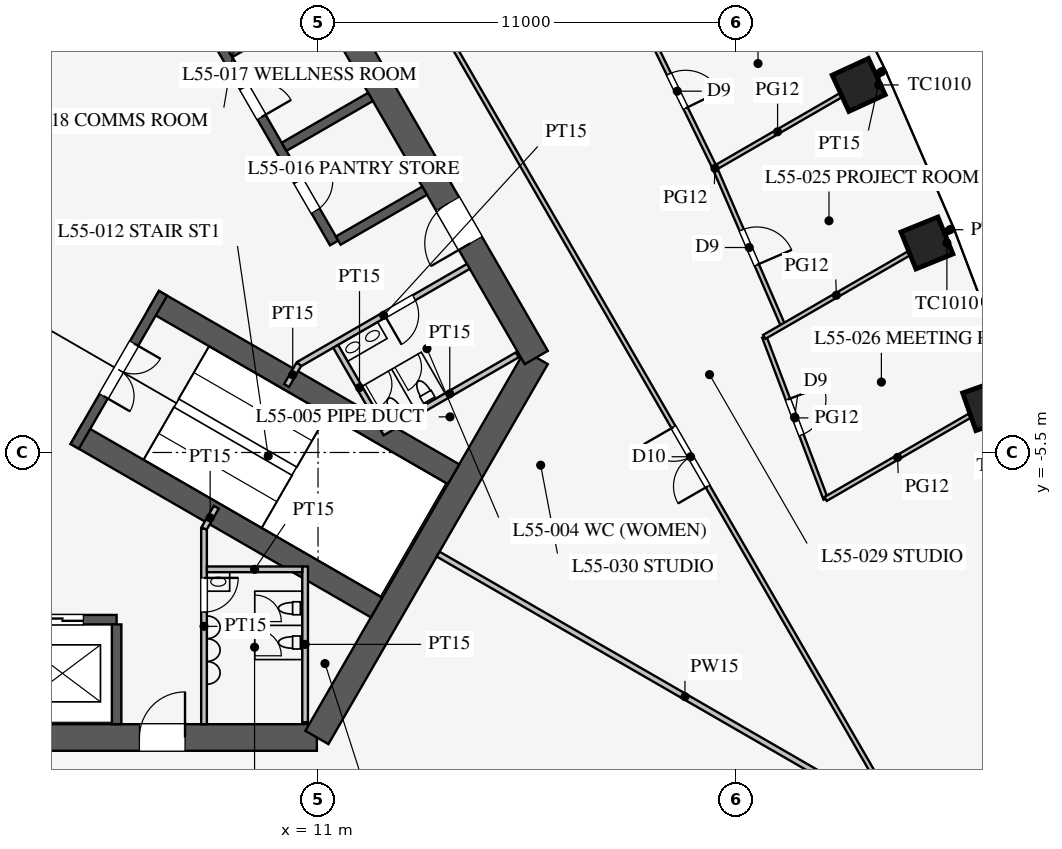
"""IFC4 building model, lengths in metres.
Left out: names, types, materials, properties, quantities, classifications, styles, units other than length and angle.
Written with IfcOpenShell. Run it as: python <this file> out.ifc"""

import sys

from ifc_helpers import new_model, si_unit, direction, frame, frame_2d, origin, origin_2d, place, context, subcontext, project, spatial, rectangle, extrude, element, fill, save


model = new_model("IFC4")
c1 = context("Model", 3, precision=1e-05, world=origin(), true_north=direction((0.0, 1.0)))
c2 = subcontext(c1, "Body", "Model", "MODEL_VIEW")
j1 = project(units=[si_unit("LENGTHUNIT", "METRE"), si_unit("PLANEANGLEUNIT", "RADIAN")], contexts=[c1])
p1 = place(None, origin())
s1 = spatial("IfcSite", under=j1, at=p1, CompositionType="ELEMENT")
p2 = place(p1, origin())
s2 = spatial("IfcBuilding", under=s1, at=p2, CompositionType="ELEMENT")
p3 = place(p2, frame((0.0, 0.0, 240.1)))
s3 = spatial("IfcBuildingStorey", under=s2, at=p3, CompositionType="ELEMENT", Elevation=240.1)
for number, where, z_axis, x_axis in (
    (1, (28.632, -4.254, 0.0), (0.0, 0.0, 1.0), (-0.332, 0.943, 0.0)),
    (2, (27.022, 0.013, 0.0), (0.0, 0.0, 1.0), (-0.376, 0.927, 0.0)),
    (3, (25.227, 4.172, 0.0), (0.0, 0.0, 1.0), (-0.418, 0.908, 0.0)),
):
    element("IfcColumn", number, at=place(p3, frame(where, z_axis=z_axis, x_axis=x_axis)), inside=s3, PredefinedType="COLUMN", context=c2, shape_type="SweptSolid", body=[
        extrude(rectangle(XDim=1.05, YDim=1.05, at=origin_2d()), origin(), (0.0, 0.0, 1.0), 4.2),
    ])
p4 = place(p3, frame((-10.97, -13.0, 0.0), z_axis=(0.0, 0.0, 1.0), x_axis=(1.0, 0.0, 0.0)))
e4 = element("IfcWall", 4, at=p4, inside=s3, PredefinedType="SHEAR", context=c2, shape_type="SweptSolid", body=[
    extrude(rectangle(XDim=21.939, YDim=0.7, at=frame_2d((10.97, 0.0))), origin(), (0.0, 0.0, 1.0), 4.2),
])
p5 = place(p4, frame((17.27, 0.0, 0.0)))
e5 = element("IfcOpeningElement", 5, at=p5, cuts=e4, PredefinedType="OPENING", context=c2, shape_type="SweptSolid", body=[
    extrude(rectangle(XDim=1.2, YDim=2.1, at=frame_2d((0.6, 1.05))), frame((0.0, 0.36, 0.0), z_axis=(0.0, -1.0, 0.0), x_axis=(1.0, 0.0, 0.0)), (0.0, 0.0, 1.0), 0.72),
])
p6 = place(p4, frame((3.47, 0.0, 0.0)))
e6 = element("IfcOpeningElement", 6, at=p6, cuts=e4, PredefinedType="OPENING", context=c2, shape_type="SweptSolid", body=[
    extrude(rectangle(XDim=1.2, YDim=2.1, at=frame_2d((0.6, 1.05))), frame((0.0, 0.36, 0.0), z_axis=(0.0, -1.0, 0.0), x_axis=(1.0, 0.0, 0.0)), (0.0, 0.0, 1.0), 0.72),
])
p7 = place(p3, frame((10.97, -13.0, 0.0), z_axis=(0.0, 0.0, 1.0), x_axis=(0.499995765644, 0.866027848477, 0.0)))
e7 = element("IfcWall", 7, at=p7, inside=s3, PredefinedType="SHEAR", context=c2, shape_type="SweptSolid", body=[
    extrude(rectangle(XDim=11.547, YDim=0.7, at=frame_2d((5.773, 0.0))), origin(), (0.0, 0.0, 1.0), 4.2),
])
p8 = place(p3, frame((16.743, -3.0, 0.0), z_axis=(0.0, 0.0, 1.0), x_axis=(-0.500002442456, 0.866023993627, 0.0)))
e8 = element("IfcWall", 8, at=p8, inside=s3, PredefinedType="SHEAR", context=c2, shape_type="SweptSolid", body=[
    extrude(rectangle(XDim=21.939, YDim=0.7, at=frame_2d((10.97, 0.0))), origin(), (0.0, 0.0, 1.0), 4.2),
])
p9 = place(p8, frame((17.27, 0.0, 0.0)))
e9 = element("IfcOpeningElement", 9, at=p9, cuts=e8, PredefinedType="OPENING", context=c2, shape_type="SweptSolid", body=[
    extrude(rectangle(XDim=1.2, YDim=2.1, at=frame_2d((0.6, 1.05))), frame((0.0, 0.36, 0.0), z_axis=(0.0, -1.0, 0.0), x_axis=(1.0, 0.0, 0.0)), (0.0, 0.0, 1.0), 0.72),
])
p10 = place(p8, frame((3.47, 0.0, 0.0)))
e10 = element("IfcOpeningElement", 10, at=p10, cuts=e8, PredefinedType="OPENING", context=c2, shape_type="SweptSolid", body=[
    extrude(rectangle(XDim=1.2, YDim=2.1, at=frame_2d((0.6, 1.05))), frame((0.0, 0.36, 0.0), z_axis=(0.0, -1.0, 0.0), x_axis=(1.0, 0.0, 0.0)), (0.0, 0.0, 1.0), 0.72),
])
p11 = place(p3, frame((-5.7, -9.9, 0.0), z_axis=(0.0, 0.0, 1.0), x_axis=(1.0, 0.0, 0.0)))
e11 = element("IfcWall", 11, at=p11, inside=s3, PredefinedType="SHEAR", context=c2, shape_type="SweptSolid", body=[
    extrude(rectangle(XDim=11.4, YDim=0.25, at=frame_2d((5.7, 0.0))), origin(), (0.0, 0.0, 1.0), 4.2),
])
p12 = place(p11, frame((0.875, 0.0, 0.0)))
e12 = element("IfcOpeningElement", 12, at=p12, cuts=e11, PredefinedType="OPENING", context=c2, shape_type="SweptSolid", body=[
    extrude(rectangle(XDim=1.1, YDim=2.2, at=frame_2d((0.55, 1.1))), frame((0.0, 0.135, 0.0), z_axis=(0.0, -1.0, 0.0), x_axis=(1.0, 0.0, 0.0)), (0.0, 0.0, 1.0), 0.27),
])
p13 = place(p11, frame((3.725, 0.0, 0.0)))
e13 = element("IfcOpeningElement", 13, at=p13, cuts=e11, PredefinedType="OPENING", context=c2, shape_type="SweptSolid", body=[
    extrude(rectangle(XDim=1.1, YDim=2.2, at=frame_2d((0.55, 1.1))), frame((0.0, 0.135, 0.0), z_axis=(0.0, -1.0, 0.0), x_axis=(1.0, 0.0, 0.0)), (0.0, 0.0, 1.0), 0.27),
])
p14 = place(p11, frame((6.575, 0.0, 0.0)))
e14 = element("IfcOpeningElement", 14, at=p14, cuts=e11, PredefinedType="OPENING", context=c2, shape_type="SweptSolid", body=[
    extrude(rectangle(XDim=1.1, YDim=2.2, at=frame_2d((0.55, 1.1))), frame((0.0, 0.135, 0.0), z_axis=(0.0, -1.0, 0.0), x_axis=(1.0, 0.0, 0.0)), (0.0, 0.0, 1.0), 0.27),
])
p15 = place(p11, frame((9.425, 0.0, 0.0)))
e15 = element("IfcOpeningElement", 15, at=p15, cuts=e11, PredefinedType="OPENING", context=c2, shape_type="SweptSolid", body=[
    extrude(rectangle(XDim=1.1, YDim=2.2, at=frame_2d((0.55, 1.1))), frame((0.0, 0.135, 0.0), z_axis=(0.0, -1.0, 0.0), x_axis=(1.0, 0.0, 0.0)), (0.0, 0.0, 1.0), 0.27),
])
p16 = place(p3, frame((5.7, -10.025, 0.0), z_axis=(0.0, 0.0, 1.0), x_axis=(0.0, -1.0, 0.0)))
e16 = element("IfcWall", 16, at=p16, inside=s3, PredefinedType="SHEAR", context=c2, shape_type="SweptSolid", body=[
    extrude(rectangle(XDim=2.625, YDim=0.25, at=frame_2d((1.312, 0.0))), origin(), (0.0, 0.0, 1.0), 4.2),
])
p17 = place(p3, frame((11.424, 0.014, 0.0), z_axis=(0.0, 0.0, 1.0), x_axis=(-0.500001763848, 0.866024385424, 0.0)))
e17 = element("IfcWall", 17, at=p17, inside=s3, PredefinedType="SHEAR", context=c2, shape_type="SweptSolid", body=[
    extrude(rectangle(XDim=11.4, YDim=0.25, at=frame_2d((5.7, 0.0))), origin(), (0.0, 0.0, 1.0), 4.2),
])
p18 = place(p17, frame((0.975, 0.0, 0.0)))
e18 = element("IfcOpeningElement", 18, at=p18, cuts=e17, PredefinedType="OPENING", context=c2, shape_type="SweptSolid", body=[
    extrude(rectangle(XDim=0.9, YDim=2.1, at=frame_2d((0.45, 1.05))), frame((0.0, 0.135, 0.0), z_axis=(0.0, -1.0, 0.0), x_axis=(1.0, 0.0, 0.0)), (0.0, 0.0, 1.0), 0.27),
])
p19 = place(p17, frame((3.825, 0.0, 0.0)))
e19 = element("IfcOpeningElement", 19, at=p19, cuts=e17, PredefinedType="OPENING", context=c2, shape_type="SweptSolid", body=[
    extrude(rectangle(XDim=0.9, YDim=2.1, at=frame_2d((0.45, 1.05))), frame((0.0, 0.135, 0.0), z_axis=(0.0, -1.0, 0.0), x_axis=(1.0, 0.0, 0.0)), (0.0, 0.0, 1.0), 0.27),
])
p20 = place(p17, frame((6.675, 0.0, 0.0)))
e20 = element("IfcOpeningElement", 20, at=p20, cuts=e17, PredefinedType="OPENING", context=c2, shape_type="SweptSolid", body=[
    extrude(rectangle(XDim=0.9, YDim=2.1, at=frame_2d((0.45, 1.05))), frame((0.0, 0.135, 0.0), z_axis=(0.0, -1.0, 0.0), x_axis=(1.0, 0.0, 0.0)), (0.0, 0.0, 1.0), 0.27),
])
p21 = place(p17, frame((9.525, 0.0, 0.0)))
e21 = element("IfcOpeningElement", 21, at=p21, cuts=e17, PredefinedType="OPENING", context=c2, shape_type="SweptSolid", body=[
    extrude(rectangle(XDim=0.9, YDim=2.1, at=frame_2d((0.45, 1.05))), frame((0.0, 0.135, 0.0), z_axis=(0.0, -1.0, 0.0), x_axis=(1.0, 0.0, 0.0)), (0.0, 0.0, 1.0), 0.27),
])
for number, where, z_axis, x_axis in (
    (22, (11.532, 0.076, 0.0), (0.0, 0.0, 1.0), (0.866, 0.5, 0.0)),
    (23, (10.107, 2.544, 0.0), (0.0, 0.0, 1.0), (0.866, 0.5, 0.0)),
    (24, (8.682, 5.012, 0.0), (0.0, 0.0, 1.0), (0.866, 0.5, 0.0)),
):
    element("IfcWall", number, at=place(p3, frame(where, z_axis=z_axis, x_axis=x_axis)), inside=s3, PredefinedType="SHEAR", context=c2, shape_type="SweptSolid", body=[
        extrude(rectangle(XDim=2.625, YDim=0.25, at=frame_2d((1.312, 0.0))), origin(), (0.0, 0.0, 1.0), 4.2),
    ])
for number, where, z_axis, x_axis in (
    (25, (4.638, -5.016, 0.0), (0.0, 0.0, 1.0), (0.866, -0.5, 0.0)),
    (26, (6.663, -1.509, 0.0), (0.0, 0.0, 1.0), (0.866, -0.5, 0.0)),
):
    element("IfcWall", number, at=place(p3, frame(where, z_axis=z_axis, x_axis=x_axis)), inside=s3, PredefinedType="SHEAR", context=c2, shape_type="SweptSolid", body=[
        extrude(rectangle(XDim=9.125, YDim=0.6, at=frame_2d((4.562, 0.0))), origin(), (0.0, 0.0, 1.0), 4.2),
    ])
p22 = place(p3, frame((4.597, -5.339, 0.0), z_axis=(0.0, 0.0, 1.0), x_axis=(0.499984536904, 0.866034331223, 0.0)))
e27 = element("IfcWall", 27, at=p22, inside=s3, PredefinedType="SHEAR", context=c2, shape_type="SweptSolid", body=[
    extrude(rectangle(XDim=4.65, YDim=0.25, at=frame_2d((2.325, 0.0))), origin(), (0.0, 0.0, 1.0), 4.2),
])
p23 = place(p22, frame((1.525, 0.0, 0.0)))
e28 = element("IfcOpeningElement", 28, at=p23, cuts=e27, PredefinedType="OPENING", context=c2, shape_type="SweptSolid", body=[
    extrude(rectangle(XDim=1.6, YDim=2.1, at=frame_2d((0.8, 1.05))), frame((0.0, 0.135, 0.0), z_axis=(0.0, -1.0, 0.0), x_axis=(1.0, 0.0, 0.0)), (0.0, 0.0, 1.0), 0.27),
])
p24 = place(p3, frame((8.0, -7.5, 0.0), z_axis=(0.0, 0.0, 1.0), x_axis=(0.0, -1.0, 0.0)))
e29 = element("IfcWall", 29, at=p24, inside=s3, PredefinedType="PARTITIONING", context=c2, shape_type="SweptSolid", body=[
    extrude(rectangle(XDim=5.15, YDim=0.15, at=frame_2d((2.575, 0.0))), origin(), (0.0, 0.0, 1.0), 4.0),
])
p25 = place(p24, frame((1.3, 0.0, 0.0)))
e30 = element("IfcOpeningElement", 30, at=p25, cuts=e29, PredefinedType="OPENING", context=c2, shape_type="SweptSolid", body=[
    extrude(rectangle(XDim=0.9, YDim=2.1, at=frame_2d((0.45, 1.05))), frame((0.0, 0.085, 0.0), z_axis=(0.0, -1.0, 0.0), x_axis=(1.0, 0.0, 0.0)), (0.0, 0.0, 1.0), 0.17),
])
p26 = place(p3, frame((10.495, -3.178, 0.0), z_axis=(0.0, 0.0, 1.0), x_axis=(0.866037967349, 0.499978238636, 0.0)))
e31 = element("IfcWall", 31, at=p26, inside=s3, PredefinedType="PARTITIONING", context=c2, shape_type="SweptSolid", body=[
    extrude(rectangle(XDim=5.15, YDim=0.15, at=frame_2d((2.575, 0.0))), origin(), (0.0, 0.0, 1.0), 4.0),
])
p27 = place(p26, frame((2.6, 0.0, 0.0)))
e32 = element("IfcOpeningElement", 32, at=p27, cuts=e31, PredefinedType="OPENING", context=c2, shape_type="SweptSolid", body=[
    extrude(rectangle(XDim=0.9, YDim=2.1, at=frame_2d((0.45, 1.05))), frame((0.0, 0.085, 0.0), z_axis=(0.0, -1.0, 0.0), x_axis=(1.0, 0.0, 0.0)), (0.0, 0.0, 1.0), 0.17),
])
for number, where, z_axis, x_axis in (
    (33, (8.0, -7.5, 0.0), (0.0, 0.0, 1.0), (0.5, 0.866, 0.0)),
    (34, (10.495, -3.178, 0.0), (0.0, 0.0, 1.0), (-0.5, -0.866, 0.0)),
):
    element("IfcWall", number, at=place(p3, frame(where, z_axis=z_axis, x_axis=x_axis)), inside=s3, PredefinedType="PARTITIONING", context=c2, shape_type="SweptSolid", body=[
        extrude(rectangle(XDim=0.645, YDim=0.15, at=frame_2d((0.323, 0.0))), origin(), (0.0, 0.0, 1.0), 4.0),
    ])
p28 = place(p3, frame((10.66, -8.5, 0.0), z_axis=(0.0, 0.0, 1.0), x_axis=(0.0, -1.0, 0.0)))
e35 = element("IfcWall", 35, at=p28, inside=s3, PredefinedType="PARTITIONING", context=c2, shape_type="SweptSolid", body=[
    extrude(rectangle(XDim=4.1, YDim=0.15, at=frame_2d((2.05, 0.0))), origin(), (0.0, 0.0, 1.0), 4.0),
])
p29 = place(p3, frame((8.075, -8.575, 0.0), z_axis=(0.0, 0.0, 1.0), x_axis=(1.0, 0.0, 0.0)))
e36 = element("IfcWall", 36, at=p29, inside=s3, PredefinedType="PARTITIONING", context=c2, shape_type="SweptSolid", body=[
    extrude(rectangle(XDim=2.51, YDim=0.15, at=frame_2d((1.255, 0.0))), origin(), (0.0, 0.0, 1.0), 4.0),
])
p30 = place(p3, frame((12.691, -4.982, 0.0), z_axis=(0.0, 0.0, 1.0), x_axis=(0.8660249478, 0.500000789788, 0.0)))
e37 = element("IfcWall", 37, at=p30, inside=s3, PredefinedType="PARTITIONING", context=c2, shape_type="SweptSolid", body=[
    extrude(rectangle(XDim=4.1, YDim=0.15, at=frame_2d((2.05, 0.0))), origin(), (0.0, 0.0, 1.0), 4.0),
])
p31 = place(p3, frame((11.464, -2.706, 0.0), z_axis=(0.0, 0.0, 1.0), x_axis=(0.50001992892, -0.866013897511, 0.0)))
e38 = element("IfcWall", 38, at=p31, inside=s3, PredefinedType="PARTITIONING", context=c2, shape_type="SweptSolid", body=[
    extrude(rectangle(XDim=2.51, YDim=0.15, at=frame_2d((1.255, 0.0))), origin(), (0.0, 0.0, 1.0), 4.0),
])
p32 = place(p3, frame((14.159, -8.175, 0.0), z_axis=(0.0, 0.0, 1.0), x_axis=(0.866027028085, -0.499997186618, 0.0)))
e39 = element("IfcWall", 39, at=p32, inside=s3, PredefinedType="PARTITIONING", context=c2, shape_type="SweptSolid", body=[
    extrude(rectangle(XDim=15.0, YDim=0.15, at=frame_2d((7.5, 0.0))), origin(), (0.0, 0.0, 1.0), 2.4),
])
p33 = place(p3, frame((26.328, -15.182, 0.0), z_axis=(0.0, 0.0, 1.0), x_axis=(-0.500000626146, 0.866025042278, 0.0)))
e40 = element("IfcWall", 40, at=p33, inside=s3, PredefinedType="PARTITIONING", context=c2, shape_type="SweptSolid", body=[
    extrude(rectangle(XDim=52.624, YDim=0.12, at=frame_2d((26.312, 0.0))), origin(), (0.0, 0.0, 1.0), 2.9),
])
p34 = place(p33, frame((10.15, 0.0, 0.15)))
e41 = element("IfcOpeningElement", 41, at=p34, cuts=e40, PredefinedType="OPENING", context=c2, shape_type="SweptSolid", body=[
    extrude(rectangle(XDim=1.8, YDim=2.1, at=frame_2d((0.9, 1.05))), frame((0.0, 0.07, 0.0), z_axis=(0.0, -1.0, 0.0), x_axis=(1.0, 0.0, 0.0)), (0.0, 0.0, 1.0), 0.14),
])
p35 = place(p33, frame((40.65, 0.0, 0.15)))
e42 = element("IfcOpeningElement", 42, at=p35, cuts=e40, PredefinedType="OPENING", context=c2, shape_type="SweptSolid", body=[
    extrude(rectangle(XDim=1.8, YDim=2.1, at=frame_2d((0.9, 1.05))), frame((0.0, 0.07, 0.0), z_axis=(0.0, -1.0, 0.0), x_axis=(1.0, 0.0, 0.0)), (0.0, 0.0, 1.0), 0.14),
])
p36 = place(p3, frame((27.539, 0.311, 0.0), z_axis=(0.0, 0.0, 1.0), x_axis=(0.865534352121, 0.500849563539, 0.0)))
e43 = element("IfcWall", 43, at=p36, inside=s3, PredefinedType="PARTITIONING", context=c2, shape_type="SweptSolid", body=[
    extrude(rectangle(XDim=0.206, YDim=0.15, at=frame_2d((0.103, 0.0))), origin(), (0.0, 0.0, 1.0), 2.9),
])
p37 = place(p3, frame((25.725, 4.46, 0.0), z_axis=(0.0, 0.0, 1.0), x_axis=(0.865675623716, 0.500605348058, 0.0)))
e44 = element("IfcWall", 44, at=p37, inside=s3, PredefinedType="PARTITIONING", context=c2, shape_type="SweptSolid", body=[
    extrude(rectangle(XDim=0.223, YDim=0.15, at=frame_2d((0.112, 0.0))), origin(), (0.0, 0.0, 1.0), 2.9),
])
p38 = place(p3, frame((23.24, -2.171, 0.0), z_axis=(0.0, 0.0, 1.0), x_axis=(-0.397188455592, 0.917737070595, 0.0)))
e45 = element("IfcWall", 45, at=p38, inside=s3, PredefinedType="PARTITIONING", context=c2, shape_type="SweptSolid", body=[
    extrude(rectangle(XDim=4.53, YDim=0.12, at=frame_2d((2.265, 0.0))), origin(), (0.0, 0.0, 1.0), 2.9),
])
p39 = place(p38, frame((1.75, 0.0, 0.15)))
e46 = element("IfcOpeningElement", 46, at=p39, cuts=e45, PredefinedType="OPENING", context=c2, shape_type="SweptSolid", body=[
    extrude(rectangle(XDim=1.0, YDim=2.1, at=frame_2d((0.5, 1.05))), frame((0.0, 0.07, 0.0), z_axis=(0.0, -1.0, 0.0), x_axis=(1.0, 0.0, 0.0)), (0.0, 0.0, 1.0), 0.14),
])
p40 = place(p3, frame((24.357, -6.722, 0.0), z_axis=(0.0, 0.0, 1.0), x_axis=(-0.354219967303, 0.935162132875, 0.0)))
e47 = element("IfcWall", 47, at=p40, inside=s3, PredefinedType="PARTITIONING", context=c2, shape_type="SweptSolid", body=[
    extrude(rectangle(XDim=4.559, YDim=0.12, at=frame_2d((2.28, 0.0))), origin(), (0.0, 0.0, 1.0), 2.9),
])
p41 = place(p40, frame((1.8, 0.0, 0.15)))
e48 = element("IfcOpeningElement", 48, at=p41, cuts=e47, PredefinedType="OPENING", context=c2, shape_type="SweptSolid", body=[
    extrude(rectangle(XDim=1.0, YDim=2.1, at=frame_2d((0.5, 1.05))), frame((0.0, 0.07, 0.0), z_axis=(0.0, -1.0, 0.0), x_axis=(1.0, 0.0, 0.0)), (0.0, 0.0, 1.0), 0.14),
])
p42 = place(p3, frame((21.441, 1.987, 0.0), z_axis=(0.0, 0.0, 1.0), x_axis=(-0.43911984878, 0.898428493764, 0.0)))
e49 = element("IfcWall", 49, at=p42, inside=s3, PredefinedType="PARTITIONING", context=c2, shape_type="SweptSolid", body=[
    extrude(rectangle(XDim=4.511, YDim=0.12, at=frame_2d((2.255, 0.0))), origin(), (0.0, 0.0, 1.0), 2.9),
])
p43 = place(p42, frame((1.75, 0.0, 0.15)))
e50 = element("IfcOpeningElement", 50, at=p43, cuts=e49, PredefinedType="OPENING", context=c2, shape_type="SweptSolid", body=[
    extrude(rectangle(XDim=1.0, YDim=2.1, at=frame_2d((0.5, 1.05))), frame((0.0, 0.07, 0.0), z_axis=(0.0, -1.0, 0.0), x_axis=(1.0, 0.0, 0.0)), (0.0, 0.0, 1.0), 0.14),
])
p44 = place(p3, frame((22.742, -2.458, 0.0), z_axis=(0.0, 0.0, 1.0), x_axis=(0.866033427365, 0.499986102494, 0.0)))
e51 = element("IfcWall", 51, at=p44, inside=s3, PredefinedType="PARTITIONING", context=c2, shape_type="SweptSolid", body=[
    extrude(rectangle(XDim=4.382, YDim=0.12, at=frame_2d((2.191, 0.0))), origin(), (0.0, 0.0, 1.0), 2.8),
])
p45 = place(p3, frame((24.357, -6.722, 0.0), z_axis=(0.0, 0.0, 1.0), x_axis=(0.866024693403, 0.500001230415, 0.0)))
e52 = element("IfcWall", 52, at=p45, inside=s3, PredefinedType="PARTITIONING", context=c2, shape_type="SweptSolid", body=[
    extrude(rectangle(XDim=4.372, YDim=0.12, at=frame_2d((2.186, 0.0))), origin(), (0.0, 0.0, 1.0), 2.8),
])
p46 = place(p3, frame((21.441, 1.987, 0.0), z_axis=(0.0, 0.0, 1.0), x_axis=(0.866040623776, 0.499973637274, 0.0)))
e53 = element("IfcWall", 53, at=p46, inside=s3, PredefinedType="PARTITIONING", context=c2, shape_type="SweptSolid", body=[
    extrude(rectangle(XDim=3.814, YDim=0.12, at=frame_2d((1.907, 0.0))), origin(), (0.0, 0.0, 1.0), 2.9),
])
p47 = place(p25, origin())
e54 = element("IfcDoor", 54, at=p47, inside=s3, OperationType="SINGLE_SWING_LEFT", PredefinedType="DOOR", context=c2, shape_type="SweptSolid", body=[
    extrude(rectangle(XDim=0.9, YDim=2.1, at=frame_2d((0.45, 1.05))), frame((0.0, 0.025, 0.0), z_axis=(0.0, -1.0, 0.0), x_axis=(1.0, 0.0, 0.0)), (0.0, 0.0, 1.0), 0.05),
])
fill(e30, e54)
p48 = place(p27, frame((0.9, 0.0, 0.0), z_axis=(0.0, 0.0, 1.0), x_axis=(-1.0, 0.0, 0.0)))
e55 = element("IfcDoor", 55, at=p48, inside=s3, OperationType="SINGLE_SWING_RIGHT", PredefinedType="DOOR", context=c2, shape_type="SweptSolid", body=[
    extrude(rectangle(XDim=0.9, YDim=2.1, at=frame_2d((0.45, 1.05))), frame((0.0, 0.025, 0.0), z_axis=(0.0, -1.0, 0.0), x_axis=(1.0, 0.0, 0.0)), (0.0, 0.0, 1.0), 0.05),
])
fill(e32, e55)
p49 = place(p23, frame((1.6, 0.0, 0.0), z_axis=(0.0, 0.0, 1.0), x_axis=(-1.0, 0.0, 0.0)))
e56 = element("IfcDoor", 56, at=p49, inside=s3, OperationType="DOUBLE_DOOR_SINGLE_SWING", PredefinedType="DOOR", context=c2, shape_type="SweptSolid", body=[
    extrude(rectangle(XDim=1.6, YDim=2.1, at=frame_2d((0.8, 1.05))), frame((0.0, 0.025, 0.0), z_axis=(0.0, -1.0, 0.0), x_axis=(1.0, 0.0, 0.0)), (0.0, 0.0, 1.0), 0.05),
])
fill(e28, e56)
p50 = place(p5, origin())
e57 = element("IfcDoor", 57, at=p50, inside=s3, OperationType="SINGLE_SWING_RIGHT", PredefinedType="DOOR", context=c2, shape_type="SweptSolid", body=[
    extrude(rectangle(XDim=1.2, YDim=2.1, at=frame_2d((0.6, 1.05))), frame((0.0, 0.025, 0.0), z_axis=(0.0, -1.0, 0.0), x_axis=(1.0, 0.0, 0.0)), (0.0, 0.0, 1.0), 0.05),
])
fill(e5, e57)
p51 = place(p10, origin())
e58 = element("IfcDoor", 58, at=p51, inside=s3, OperationType="SINGLE_SWING_LEFT", PredefinedType="DOOR", context=c2, shape_type="SweptSolid", body=[
    extrude(rectangle(XDim=1.2, YDim=2.1, at=frame_2d((0.6, 1.05))), frame((0.0, 0.025, 0.0), z_axis=(0.0, -1.0, 0.0), x_axis=(1.0, 0.0, 0.0)), (0.0, 0.0, 1.0), 0.05),
])
fill(e10, e58)
p52 = place(p18, frame((0.9, 0.0, 0.0), z_axis=(0.0, 0.0, 1.0), x_axis=(-1.0, 0.0, 0.0)))
e59 = element("IfcDoor", 59, at=p52, inside=s3, OperationType="SINGLE_SWING_LEFT", PredefinedType="DOOR", context=c2, shape_type="SweptSolid", body=[
    extrude(rectangle(XDim=0.9, YDim=2.1, at=frame_2d((0.45, 1.05))), frame((0.0, 0.025, 0.0), z_axis=(0.0, -1.0, 0.0), x_axis=(1.0, 0.0, 0.0)), (0.0, 0.0, 1.0), 0.05),
])
fill(e18, e59)
p53 = place(p19, frame((0.9, 0.0, 0.0), z_axis=(0.0, 0.0, 1.0), x_axis=(-1.0, 0.0, 0.0)))
e60 = element("IfcDoor", 60, at=p53, inside=s3, OperationType="SINGLE_SWING_RIGHT", PredefinedType="DOOR", context=c2, shape_type="SweptSolid", body=[
    extrude(rectangle(XDim=0.9, YDim=2.1, at=frame_2d((0.45, 1.05))), frame((0.0, 0.025, 0.0), z_axis=(0.0, -1.0, 0.0), x_axis=(1.0, 0.0, 0.0)), (0.0, 0.0, 1.0), 0.05),
])
fill(e19, e60)
p54 = place(p43, frame((1.0, 0.0, 0.0), z_axis=(0.0, 0.0, 1.0), x_axis=(-1.0, 0.0, 0.0)))
e61 = element("IfcDoor", 61, at=p54, inside=s3, OperationType="SINGLE_SWING_RIGHT", PredefinedType="DOOR", context=c2, shape_type="SweptSolid", body=[
    extrude(rectangle(XDim=1.0, YDim=2.1, at=frame_2d((0.5, 1.05))), frame((0.0, 0.025, 0.0), z_axis=(0.0, -1.0, 0.0), x_axis=(1.0, 0.0, 0.0)), (0.0, 0.0, 1.0), 0.05),
])
fill(e50, e61)
p55 = place(p39, frame((1.0, 0.0, 0.0), z_axis=(0.0, 0.0, 1.0), x_axis=(-1.0, 0.0, 0.0)))
e62 = element("IfcDoor", 62, at=p55, inside=s3, OperationType="SINGLE_SWING_RIGHT", PredefinedType="DOOR", context=c2, shape_type="SweptSolid", body=[
    extrude(rectangle(XDim=1.0, YDim=2.1, at=frame_2d((0.5, 1.05))), frame((0.0, 0.025, 0.0), z_axis=(0.0, -1.0, 0.0), x_axis=(1.0, 0.0, 0.0)), (0.0, 0.0, 1.0), 0.05),
])
fill(e46, e62)
p56 = place(p41, frame((1.0, 0.0, 0.0), z_axis=(0.0, 0.0, 1.0), x_axis=(-1.0, 0.0, 0.0)))
e63 = element("IfcDoor", 63, at=p56, inside=s3, OperationType="SINGLE_SWING_LEFT", PredefinedType="DOOR", context=c2, shape_type="SweptSolid", body=[
    extrude(rectangle(XDim=1.0, YDim=2.1, at=frame_2d((0.5, 1.05))), frame((0.0, 0.025, 0.0), z_axis=(0.0, -1.0, 0.0), x_axis=(1.0, 0.0, 0.0)), (0.0, 0.0, 1.0), 0.05),
])
fill(e48, e63)
p57 = place(p34, origin())
e64 = element("IfcDoor", 64, at=p57, inside=s3, OperationType="DOUBLE_DOOR_SINGLE_SWING", PredefinedType="DOOR", context=c2, shape_type="SweptSolid", body=[
    extrude(rectangle(XDim=1.8, YDim=2.1, at=frame_2d((0.9, 1.05))), frame((0.0, 0.025, 0.0), z_axis=(0.0, -1.0, 0.0), x_axis=(1.0, 0.0, 0.0)), (0.0, 0.0, 1.0), 0.05),
])
fill(e41, e64)
p58 = place(p15, origin())
e65 = element("IfcDoor", 65, at=p58, inside=s3, OperationType="DOUBLE_DOOR_SLIDING", PredefinedType="DOOR", context=c2, shape_type="SweptSolid", body=[
    extrude(rectangle(XDim=1.1, YDim=2.2, at=frame_2d((0.55, 1.1))), frame((0.0, 0.025, 0.0), z_axis=(0.0, -1.0, 0.0), x_axis=(1.0, 0.0, 0.0)), (0.0, 0.0, 1.0), 0.05),
])
fill(e15, e65)
save(model, sys.argv[1])
